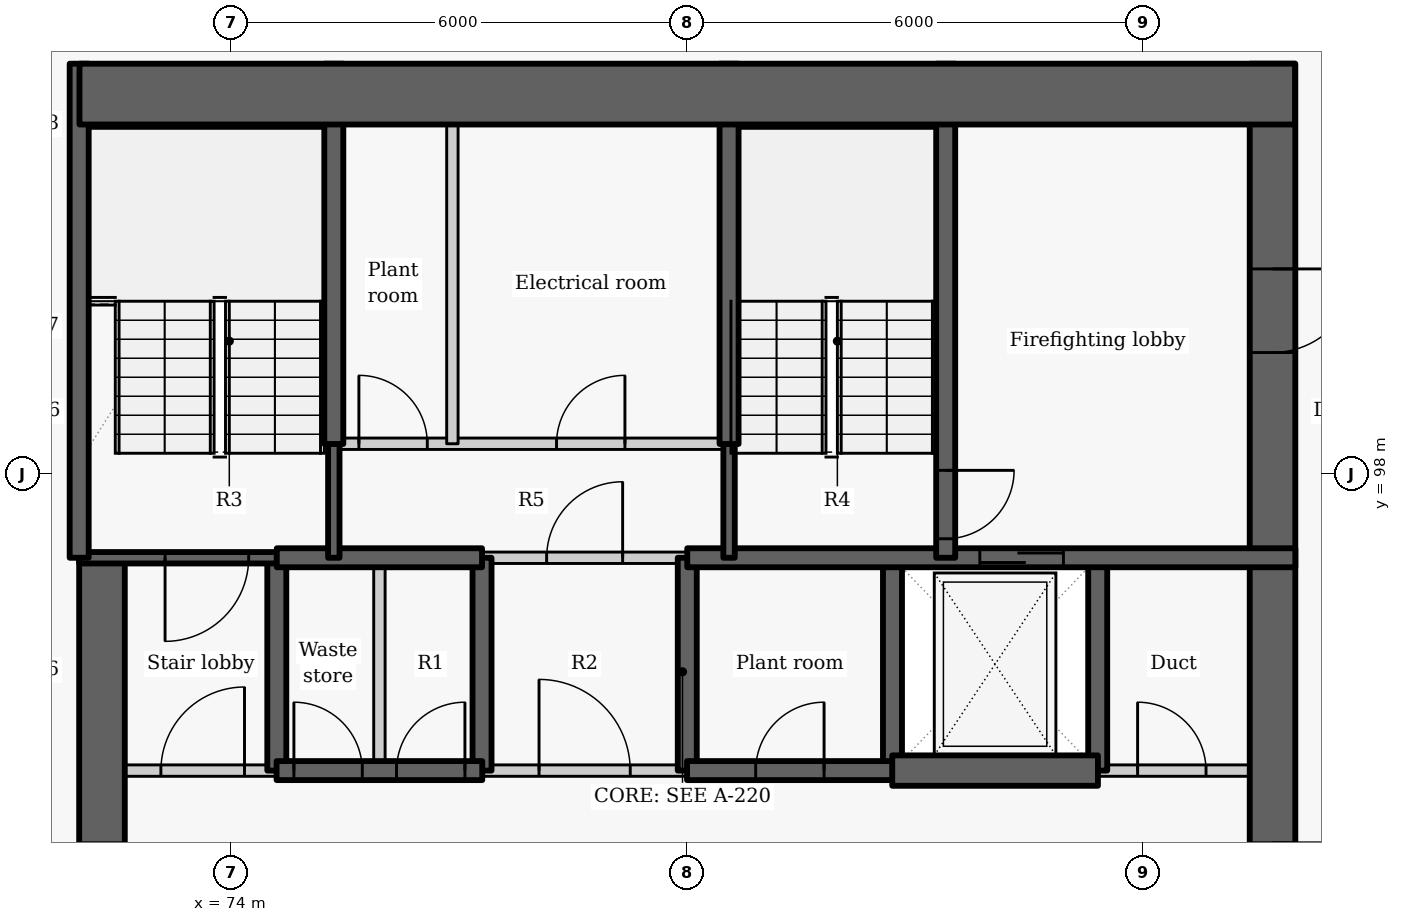
"""IFC4 building model, lengths in metres.
Left out: names, types, materials, properties, quantities, classifications, styles, units other than length and angle.
Written with IfcOpenShell. Run it as: python <this file> out.ifc"""

import sys

from ifc_helpers import new_model, si_unit, direction, frame, frame_2d, origin, place, context, subcontext, project, spatial, rectangle, extrude, element, fill, save


model = new_model("IFC4")
c1 = context("Model", 3, precision=1e-05, world=origin(), true_north=direction((0.0, 1.0)))
c2 = subcontext(c1, "Body", "Model", "MODEL_VIEW")
j1 = project(units=[si_unit("LENGTHUNIT", "METRE"), si_unit("PLANEANGLEUNIT", "RADIAN")], contexts=[c1])
p1 = place(None, origin())
s1 = spatial("IfcSite", under=j1, at=p1, CompositionType="ELEMENT")
p2 = place(p1, origin())
s2 = spatial("IfcBuilding", under=s1, at=p2, CompositionType="ELEMENT")
p3 = place(p2, frame((0.0, 0.0, 107.4)))
s3 = spatial("IfcBuildingStorey", under=s2, at=p3, CompositionType="ELEMENT", Elevation=107.4)
p4 = place(p3, frame((74.6, 94.1, -0.275), z_axis=(0.0, 0.0, 1.0), x_axis=(0.0, 1.0, 0.0)))
e1 = element("IfcWall", 1, at=p4, inside=s3, PredefinedType="SHEAR", context=c2, shape_type="SweptSolid", body=[
    extrude(rectangle(XDim=2.8, YDim=0.25, at=frame_2d((1.4, 0.0))), origin(), (0.0, 0.0, 1.0), 3.3),
])
p5 = place(p3, frame((72.3, 87.8, -0.275), z_axis=(0.0, 0.0, 1.0), x_axis=(0.0, 1.0, 0.0)))
e2 = element("IfcWall", 2, at=p5, inside=s3, PredefinedType="SHEAR", context=c2, shape_type="SweptSolid", body=[
    extrude(rectangle(XDim=9.1, YDim=0.6, at=frame_2d((4.55, 0.0))), origin(), (0.0, 0.0, 1.0), 3.3),
])
p6 = place(p5, frame((3.85, 0.0, 0.275)))
e3 = element("IfcOpeningElement", 3, at=p6, cuts=e2, PredefinedType="OPENING", context=c2, shape_type="SweptSolid", body=[
    extrude(rectangle(XDim=1.5, YDim=2.1, at=frame_2d((0.75, 1.05))), frame((0.0, 0.31, 0.0), z_axis=(0.0, -1.0, 0.0), x_axis=(1.0, 0.0, 0.0)), (0.0, 0.0, 1.0), 0.62),
])
for number, where, z_axis, x_axis in (
    (4, (77.3, 94.1, -0.275), (0.0, 0.0, 1.0), (0.0, 1.0, 0.0)),
    (5, (80.0, 94.1, -0.275), (0.0, 0.0, 1.0), (0.0, 1.0, 0.0)),
    (6, (82.7, 94.1, -0.275), (0.0, 0.0, 1.0), (0.0, 1.0, 0.0)),
    (7, (85.4, 94.1, -0.275), (0.0, 0.0, 1.0), (0.0, 1.0, 0.0)),
):
    element("IfcWall", number, at=place(p3, frame(where, z_axis=z_axis, x_axis=x_axis)), inside=s3, PredefinedType="SHEAR", context=c2, shape_type="SweptSolid", body=[
        extrude(rectangle(XDim=2.8, YDim=0.25, at=frame_2d((1.4, 0.0))), origin(), (0.0, 0.0, 1.0), 3.3),
    ])
p7 = place(p3, frame((87.7, 103.4, -0.275), z_axis=(0.0, 0.0, 1.0), x_axis=(0.0, -1.0, 0.0)))
e8 = element("IfcWall", 8, at=p7, inside=s3, PredefinedType="SHEAR", context=c2, shape_type="SweptSolid", body=[
    extrude(rectangle(XDim=15.6, YDim=0.6, at=frame_2d((7.8, 0.0))), origin(), (0.0, 0.0, 1.0), 3.3),
])
p8 = place(p7, frame((10.25, 0.0, 0.275)))
e9 = element("IfcOpeningElement", 9, at=p8, cuts=e8, PredefinedType="OPENING", context=c2, shape_type="SweptSolid", body=[
    extrude(rectangle(XDim=1.5, YDim=2.1, at=frame_2d((0.75, 1.05))), frame((0.0, 0.31, 0.0), z_axis=(0.0, -1.0, 0.0), x_axis=(1.0, 0.0, 0.0)), (0.0, 0.0, 1.0), 0.62),
])
p9 = place(p7, frame((2.7, 0.0, 0.275)))
e10 = element("IfcOpeningElement", 10, at=p9, cuts=e8, PredefinedType="OPENING", context=c2, shape_type="SweptSolid", body=[
    extrude(rectangle(XDim=1.1, YDim=2.1, at=frame_2d((0.55, 1.05))), frame((0.0, 0.31, 0.0), z_axis=(0.0, -1.0, 0.0), x_axis=(1.0, 0.0, 0.0)), (0.0, 0.0, 1.0), 0.62),
])
p10 = place(p3, frame((72.0, 94.1, 0.0), z_axis=(0.0, 0.0, 1.0), x_axis=(1.0, 0.0, 0.0)))
e11 = element("IfcWall", 11, at=p10, inside=s3, PredefinedType="PARTITIONING", context=c2, shape_type="SweptSolid", body=[
    extrude(rectangle(XDim=2.603, YDim=0.15, at=frame_2d((1.302, 0.0))), origin(), (0.0, 0.0, 1.0), 3.025),
])
p11 = place(p10, frame((1.075, 0.0, 0.0)))
e12 = element("IfcOpeningElement", 12, at=p11, cuts=e11, PredefinedType="OPENING", context=c2, shape_type="SweptSolid", body=[
    extrude(rectangle(XDim=1.1, YDim=2.1, at=frame_2d((0.55, 1.05))), frame((0.0, 0.085, 0.0), z_axis=(0.0, -1.0, 0.0), x_axis=(1.0, 0.0, 0.0)), (0.0, 0.0, 1.0), 0.17),
])
p12 = place(p3, frame((77.297, 94.1, 0.0), z_axis=(0.0, 0.0, 1.0), x_axis=(1.0, 0.0, 0.0)))
e13 = element("IfcWall", 13, at=p12, inside=s3, PredefinedType="PARTITIONING", context=c2, shape_type="SweptSolid", body=[
    extrude(rectangle(XDim=2.706, YDim=0.15, at=frame_2d((1.353, 0.0))), origin(), (0.0, 0.0, 1.0), 3.025),
])
p13 = place(p12, frame((0.753, 0.0, 0.0)))
e14 = element("IfcOpeningElement", 14, at=p13, cuts=e13, PredefinedType="OPENING", context=c2, shape_type="SweptSolid", body=[
    extrude(rectangle(XDim=1.2, YDim=2.1, at=frame_2d((0.6, 1.05))), frame((0.0, 0.085, 0.0), z_axis=(0.0, -1.0, 0.0), x_axis=(1.0, 0.0, 0.0)), (0.0, 0.0, 1.0), 0.17),
])
p14 = place(p3, frame((85.397, 94.1, 0.0), z_axis=(0.0, 0.0, 1.0), x_axis=(1.0, 0.0, 0.0)))
e15 = element("IfcWall", 15, at=p14, inside=s3, PredefinedType="PARTITIONING", context=c2, shape_type="SweptSolid", body=[
    extrude(rectangle(XDim=2.603, YDim=0.15, at=frame_2d((1.302, 0.0))), origin(), (0.0, 0.0, 1.0), 3.025),
])
p15 = place(p14, frame((0.528, 0.0, 0.0)))
e16 = element("IfcOpeningElement", 16, at=p15, cuts=e15, PredefinedType="OPENING", context=c2, shape_type="SweptSolid", body=[
    extrude(rectangle(XDim=0.9, YDim=2.1, at=frame_2d((0.45, 1.05))), frame((0.0, 0.085, 0.0), z_axis=(0.0, -1.0, 0.0), x_axis=(1.0, 0.0, 0.0)), (0.0, 0.0, 1.0), 0.17),
])
p16 = place(p3, frame((74.597, 94.1, -0.275), z_axis=(0.0, 0.0, 1.0), x_axis=(1.0, 0.0, 0.0)))
e17 = element("IfcWall", 17, at=p16, inside=s3, PredefinedType="SHEAR", context=c2, shape_type="SweptSolid", body=[
    extrude(rectangle(XDim=2.706, YDim=0.25, at=frame_2d((1.353, 0.0))), origin(), (0.0, 0.0, 1.0), 3.3),
])
p17 = place(p16, frame((0.228, 0.0, 0.275)))
e18 = element("IfcOpeningElement", 18, at=p17, cuts=e17, PredefinedType="OPENING", context=c2, shape_type="SweptSolid", body=[
    extrude(rectangle(XDim=0.9, YDim=2.1, at=frame_2d((0.45, 1.05))), frame((0.0, 0.135, 0.0), z_axis=(0.0, -1.0, 0.0), x_axis=(1.0, 0.0, 0.0)), (0.0, 0.0, 1.0), 0.27),
])
p18 = place(p16, frame((1.578, 0.0, 0.275)))
e19 = element("IfcOpeningElement", 19, at=p18, cuts=e17, PredefinedType="OPENING", context=c2, shape_type="SweptSolid", body=[
    extrude(rectangle(XDim=0.9, YDim=2.1, at=frame_2d((0.45, 1.05))), frame((0.0, 0.135, 0.0), z_axis=(0.0, -1.0, 0.0), x_axis=(1.0, 0.0, 0.0)), (0.0, 0.0, 1.0), 0.27),
])
p19 = place(p3, frame((79.997, 94.1, -0.275), z_axis=(0.0, 0.0, 1.0), x_axis=(1.0, 0.0, 0.0)))
e20 = element("IfcWall", 20, at=p19, inside=s3, PredefinedType="SHEAR", context=c2, shape_type="SweptSolid", body=[
    extrude(rectangle(XDim=2.706, YDim=0.25, at=frame_2d((1.353, 0.0))), origin(), (0.0, 0.0, 1.0), 3.3),
])
p20 = place(p19, frame((0.903, 0.0, 0.275)))
e21 = element("IfcOpeningElement", 21, at=p20, cuts=e20, PredefinedType="OPENING", context=c2, shape_type="SweptSolid", body=[
    extrude(rectangle(XDim=0.9, YDim=2.1, at=frame_2d((0.45, 1.05))), frame((0.0, 0.135, 0.0), z_axis=(0.0, -1.0, 0.0), x_axis=(1.0, 0.0, 0.0)), (0.0, 0.0, 1.0), 0.27),
])
p21 = place(p3, frame((82.697, 94.1, -0.275), z_axis=(0.0, 0.0, 1.0), x_axis=(1.0, 0.0, 0.0)))
e22 = element("IfcWall", 22, at=p21, inside=s3, PredefinedType="SHEAR", context=c2, shape_type="SweptSolid", body=[
    extrude(rectangle(XDim=2.706, YDim=0.4, at=frame_2d((1.353, 0.0))), origin(), (0.0, 0.0, 1.0), 3.3),
])
p22 = place(p3, frame((74.6, 96.9, -0.275), z_axis=(0.0, 0.0, 1.0), x_axis=(-1.0, 0.0, 0.0)))
e23 = element("IfcWall", 23, at=p22, inside=s3, PredefinedType="SHEAR", context=c2, shape_type="SweptSolid", body=[
    extrude(rectangle(XDim=2.6, YDim=0.15, at=frame_2d((1.3, 0.0))), origin(), (0.0, 0.0, 1.0), 3.3),
])
p23 = place(p22, frame((0.37, 0.0, 0.275)))
e24 = element("IfcOpeningElement", 24, at=p23, cuts=e23, PredefinedType="OPENING", context=c2, shape_type="SweptSolid", body=[
    extrude(rectangle(XDim=1.1, YDim=2.1, at=frame_2d((0.55, 1.05))), frame((0.0, 0.085, 0.0), z_axis=(0.0, -1.0, 0.0), x_axis=(1.0, 0.0, 0.0)), (0.0, 0.0, 1.0), 0.17),
])
p24 = place(p3, frame((75.95, 94.1, 0.0), z_axis=(0.0, 0.0, 1.0), x_axis=(0.0, 1.0, 0.0)))
e25 = element("IfcWall", 25, at=p24, inside=s3, PredefinedType="PARTITIONING", context=c2, shape_type="SweptSolid", body=[
    extrude(rectangle(XDim=2.8, YDim=0.15, at=frame_2d((1.4, 0.0))), origin(), (0.0, 0.0, 1.0), 3.025),
])
p25 = place(p3, frame((74.6, 96.9, -0.275), z_axis=(0.0, 0.0, 1.0), x_axis=(1.0, 0.0, 0.0)))
e26 = element("IfcWall", 26, at=p25, inside=s3, PredefinedType="SHEAR", context=c2, shape_type="SweptSolid", body=[
    extrude(rectangle(XDim=2.7, YDim=0.25, at=frame_2d((1.35, 0.0))), origin(), (0.0, 0.0, 1.0), 3.3),
])
p26 = place(p3, frame((80.0, 96.9, -0.275), z_axis=(0.0, 0.0, 1.0), x_axis=(1.0, 0.0, 0.0)))
e27 = element("IfcWall", 27, at=p26, inside=s3, PredefinedType="SHEAR", context=c2, shape_type="SweptSolid", body=[
    extrude(rectangle(XDim=8.0, YDim=0.25, at=frame_2d((4.0, 0.0))), origin(), (0.0, 0.0, 1.0), 3.3),
])
p27 = place(p26, frame((3.849, 0.0, 0.275)))
e28 = element("IfcOpeningElement", 28, at=p27, cuts=e27, PredefinedType="OPENING", context=c2, shape_type="SweptSolid", body=[
    extrude(rectangle(XDim=1.1, YDim=2.1, at=frame_2d((0.55, 1.05))), frame((0.0, 0.135, 0.0), z_axis=(0.0, -1.0, 0.0), x_axis=(1.0, 0.0, 0.0)), (0.0, 0.0, 1.0), 0.27),
])
p28 = place(p3, frame((77.3, 96.9, 0.0), z_axis=(0.0, 0.0, 1.0), x_axis=(1.0, 0.0, 0.0)))
e29 = element("IfcWall", 29, at=p28, inside=s3, PredefinedType="PARTITIONING", context=c2, shape_type="SweptSolid", body=[
    extrude(rectangle(XDim=2.7, YDim=0.15, at=frame_2d((1.35, 0.0))), origin(), (0.0, 0.0, 1.0), 3.025),
])
p29 = place(p28, frame((0.85, 0.0, 0.0)))
e30 = element("IfcOpeningElement", 30, at=p29, cuts=e29, PredefinedType="OPENING", context=c2, shape_type="SweptSolid", body=[
    extrude(rectangle(XDim=1.0, YDim=2.1, at=frame_2d((0.5, 1.05))), frame((0.0, 0.085, 0.0), z_axis=(0.0, -1.0, 0.0), x_axis=(1.0, 0.0, 0.0)), (0.0, 0.0, 1.0), 0.17),
])
p30 = place(p3, frame((75.35, 96.9, -0.275), z_axis=(0.0, 0.0, 1.0), x_axis=(0.0, 1.0, 0.0)))
e31 = element("IfcWall", 31, at=p30, inside=s3, PredefinedType="SHEAR", context=c2, shape_type="SweptSolid", body=[
    extrude(rectangle(XDim=1.503, YDim=0.15, at=frame_2d((0.751, 0.0))), origin(), (0.0, 0.0, 1.0), 3.3),
])
p31 = place(p3, frame((75.35, 98.397, -0.275), z_axis=(0.0, 0.0, 1.0), x_axis=(0.0, 1.0, 0.0)))
e32 = element("IfcWall", 32, at=p31, inside=s3, PredefinedType="SHEAR", context=c2, shape_type="SweptSolid", body=[
    extrude(rectangle(XDim=5.003, YDim=0.25, at=frame_2d((2.501, 0.0))), origin(), (0.0, 0.0, 1.0), 3.3),
])
p32 = place(p3, frame((72.0, 96.9, -0.275), z_axis=(0.0, 0.0, 1.0), x_axis=(0.0, 1.0, 0.0)))
e33 = element("IfcWall", 33, at=p32, inside=s3, PredefinedType="SHEAR", context=c2, shape_type="SweptSolid", body=[
    extrude(rectangle(XDim=6.5, YDim=0.25, at=frame_2d((3.25, 0.0))), origin(), (0.0, 0.0, 1.0), 3.3),
])
p33 = place(p3, frame((83.4, 103.4, -0.275), z_axis=(0.0, 0.0, 1.0), x_axis=(0.0, -1.0, 0.0)))
e34 = element("IfcWall", 34, at=p33, inside=s3, PredefinedType="SHEAR", context=c2, shape_type="SweptSolid", body=[
    extrude(rectangle(XDim=6.5, YDim=0.25, at=frame_2d((3.25, 0.0))), origin(), (0.0, 0.0, 1.0), 3.3),
])
p34 = place(p33, frame((5.35, 0.0, 0.275)))
e35 = element("IfcOpeningElement", 35, at=p34, cuts=e34, PredefinedType="OPENING", context=c2, shape_type="SweptSolid", body=[
    extrude(rectangle(XDim=0.9, YDim=2.1, at=frame_2d((0.45, 1.05))), frame((0.0, 0.135, 0.0), z_axis=(0.0, -1.0, 0.0), x_axis=(1.0, 0.0, 0.0)), (0.0, 0.0, 1.0), 0.27),
])
p35 = place(p3, frame((80.55, 96.9, -0.275), z_axis=(0.0, 0.0, 1.0), x_axis=(0.0, 1.0, 0.0)))
e36 = element("IfcWall", 36, at=p35, inside=s3, PredefinedType="SHEAR", context=c2, shape_type="SweptSolid", body=[
    extrude(rectangle(XDim=1.503, YDim=0.15, at=frame_2d((0.751, 0.0))), origin(), (0.0, 0.0, 1.0), 3.3),
])
p36 = place(p3, frame((80.55, 98.397, -0.275), z_axis=(0.0, 0.0, 1.0), x_axis=(0.0, 1.0, 0.0)))
e37 = element("IfcWall", 37, at=p36, inside=s3, PredefinedType="SHEAR", context=c2, shape_type="SweptSolid", body=[
    extrude(rectangle(XDim=5.003, YDim=0.25, at=frame_2d((2.501, 0.0))), origin(), (0.0, 0.0, 1.0), 3.3),
])
p37 = place(p3, frame((75.35, 98.4, 0.0), z_axis=(0.0, 0.0, 1.0), x_axis=(1.0, 0.0, 0.0)))
e38 = element("IfcWall", 38, at=p37, inside=s3, PredefinedType="PARTITIONING", context=c2, shape_type="SweptSolid", body=[
    extrude(rectangle(XDim=5.2, YDim=0.15, at=frame_2d((2.6, 0.0))), origin(), (0.0, 0.0, 1.0), 3.025),
])
p38 = place(p37, frame((0.33, 0.0, 0.0)))
e39 = element("IfcOpeningElement", 39, at=p38, cuts=e38, PredefinedType="OPENING", context=c2, shape_type="SweptSolid", body=[
    extrude(rectangle(XDim=0.9, YDim=2.1, at=frame_2d((0.45, 1.05))), frame((0.0, 0.085, 0.0), z_axis=(0.0, -1.0, 0.0), x_axis=(1.0, 0.0, 0.0)), (0.0, 0.0, 1.0), 0.17),
])
p39 = place(p37, frame((2.93, 0.0, 0.0)))
e40 = element("IfcOpeningElement", 40, at=p39, cuts=e38, PredefinedType="OPENING", context=c2, shape_type="SweptSolid", body=[
    extrude(rectangle(XDim=0.9, YDim=2.1, at=frame_2d((0.45, 1.05))), frame((0.0, 0.085, 0.0), z_axis=(0.0, -1.0, 0.0), x_axis=(1.0, 0.0, 0.0)), (0.0, 0.0, 1.0), 0.17),
])
p40 = place(p3, frame((76.91, 98.4, 0.0), z_axis=(0.0, 0.0, 1.0), x_axis=(0.0, 1.0, 0.0)))
e41 = element("IfcWall", 41, at=p40, inside=s3, PredefinedType="PARTITIONING", context=c2, shape_type="SweptSolid", body=[
    extrude(rectangle(XDim=5.0, YDim=0.15, at=frame_2d((2.5, 0.0))), origin(), (0.0, 0.0, 1.0), 3.025),
])
p41 = place(p3, frame((72.004, 103.0, -0.275), z_axis=(0.0, 0.0, 1.0), x_axis=(1.0, 0.0, 0.0)))
e42 = element("IfcWall", 42, at=p41, inside=s3, PredefinedType="SHEAR", context=c2, shape_type="SweptSolid", body=[
    extrude(rectangle(XDim=15.992, YDim=0.8, at=frame_2d((7.996, 0.0))), origin(), (0.0, 0.0, 1.0), 3.3),
])
p42 = place(p11, origin())
e43 = element("IfcDoor", 43, at=p42, inside=s3, OperationType="SINGLE_SWING_RIGHT", PredefinedType="DOOR", context=c2, shape_type="SweptSolid", body=[
    extrude(rectangle(XDim=1.1, YDim=2.1, at=frame_2d((0.55, 1.05))), frame((0.0, 0.025, 0.0), z_axis=(0.0, -1.0, 0.0), x_axis=(1.0, 0.0, 0.0)), (0.0, 0.0, 1.0), 0.05),
])
fill(e12, e43)
p43 = place(p17, origin())
e44 = element("IfcDoor", 44, at=p43, inside=s3, OperationType="SINGLE_SWING_LEFT", PredefinedType="DOOR", context=c2, shape_type="SweptSolid", body=[
    extrude(rectangle(XDim=0.9, YDim=2.1, at=frame_2d((0.45, 1.05))), frame((0.0, 0.025, 0.0), z_axis=(0.0, -1.0, 0.0), x_axis=(1.0, 0.0, 0.0)), (0.0, 0.0, 1.0), 0.05),
])
fill(e18, e44)
p44 = place(p18, origin())
e45 = element("IfcDoor", 45, at=p44, inside=s3, OperationType="SINGLE_SWING_RIGHT", PredefinedType="DOOR", context=c2, shape_type="SweptSolid", body=[
    extrude(rectangle(XDim=0.9, YDim=2.1, at=frame_2d((0.45, 1.05))), frame((0.0, 0.025, 0.0), z_axis=(0.0, -1.0, 0.0), x_axis=(1.0, 0.0, 0.0)), (0.0, 0.0, 1.0), 0.05),
])
fill(e19, e45)
p45 = place(p13, origin())
e46 = element("IfcDoor", 46, at=p45, inside=s3, OperationType="DOUBLE_DOOR_SINGLE_SWING", PredefinedType="DOOR", context=c2, shape_type="SweptSolid", body=[
    extrude(rectangle(XDim=1.2, YDim=2.1, at=frame_2d((0.6, 1.05))), frame((0.0, 0.025, 0.0), z_axis=(0.0, -1.0, 0.0), x_axis=(1.0, 0.0, 0.0)), (0.0, 0.0, 1.0), 0.05),
])
fill(e14, e46)
p46 = place(p20, origin())
e47 = element("IfcDoor", 47, at=p46, inside=s3, OperationType="SINGLE_SWING_RIGHT", PredefinedType="DOOR", context=c2, shape_type="SweptSolid", body=[
    extrude(rectangle(XDim=0.9, YDim=2.1, at=frame_2d((0.45, 1.05))), frame((0.0, 0.025, 0.0), z_axis=(0.0, -1.0, 0.0), x_axis=(1.0, 0.0, 0.0)), (0.0, 0.0, 1.0), 0.05),
])
fill(e21, e47)
p47 = place(p27, origin())
e48 = element("IfcDoor", 48, at=p47, inside=s3, OperationType="SLIDING_TO_LEFT", PredefinedType="DOOR", context=c2, shape_type="SweptSolid", body=[
    extrude(rectangle(XDim=1.1, YDim=2.1, at=frame_2d((0.55, 1.05))), frame((0.0, 0.025, 0.0), z_axis=(0.0, -1.0, 0.0), x_axis=(1.0, 0.0, 0.0)), (0.0, 0.0, 1.0), 0.05),
])
fill(e28, e48)
p48 = place(p15, origin())
e49 = element("IfcDoor", 49, at=p48, inside=s3, OperationType="SINGLE_SWING_LEFT", PredefinedType="DOOR", context=c2, shape_type="SweptSolid", body=[
    extrude(rectangle(XDim=0.9, YDim=2.1, at=frame_2d((0.45, 1.05))), frame((0.0, 0.025, 0.0), z_axis=(0.0, -1.0, 0.0), x_axis=(1.0, 0.0, 0.0)), (0.0, 0.0, 1.0), 0.05),
])
fill(e16, e49)
p49 = place(p29, origin())
e50 = element("IfcDoor", 50, at=p49, inside=s3, OperationType="SINGLE_SWING_RIGHT", PredefinedType="DOOR", context=c2, shape_type="SweptSolid", body=[
    extrude(rectangle(XDim=1.0, YDim=2.1, at=frame_2d((0.5, 1.05))), frame((0.0, 0.025, 0.0), z_axis=(0.0, -1.0, 0.0), x_axis=(1.0, 0.0, 0.0)), (0.0, 0.0, 1.0), 0.05),
])
fill(e30, e50)
p50 = place(p38, origin())
e51 = element("IfcDoor", 51, at=p50, inside=s3, OperationType="SINGLE_SWING_LEFT", PredefinedType="DOOR", context=c2, shape_type="SweptSolid", body=[
    extrude(rectangle(XDim=0.9, YDim=2.1, at=frame_2d((0.45, 1.05))), frame((0.0, 0.025, 0.0), z_axis=(0.0, -1.0, 0.0), x_axis=(1.0, 0.0, 0.0)), (0.0, 0.0, 1.0), 0.05),
])
fill(e39, e51)
p51 = place(p39, origin())
e52 = element("IfcDoor", 52, at=p51, inside=s3, OperationType="SINGLE_SWING_RIGHT", PredefinedType="DOOR", context=c2, shape_type="SweptSolid", body=[
    extrude(rectangle(XDim=0.9, YDim=2.1, at=frame_2d((0.45, 1.05))), frame((0.0, 0.025, 0.0), z_axis=(0.0, -1.0, 0.0), x_axis=(1.0, 0.0, 0.0)), (0.0, 0.0, 1.0), 0.05),
])
fill(e40, e52)
p52 = place(p23, origin())
e53 = element("IfcDoor", 53, at=p52, inside=s3, OperationType="SINGLE_SWING_RIGHT", PredefinedType="DOOR", context=c2, shape_type="SweptSolid", body=[
    extrude(rectangle(XDim=1.1, YDim=2.1, at=frame_2d((0.55, 1.05))), frame((0.0, 0.025, 0.0), z_axis=(0.0, -1.0, 0.0), x_axis=(1.0, 0.0, 0.0)), (0.0, 0.0, 1.0), 0.05),
])
fill(e24, e53)
p53 = place(p34, origin())
e54 = element("IfcDoor", 54, at=p53, inside=s3, OperationType="SINGLE_SWING_LEFT", PredefinedType="DOOR", context=c2, shape_type="SweptSolid", body=[
    extrude(rectangle(XDim=0.9, YDim=2.1, at=frame_2d((0.45, 1.05))), frame((0.0, 0.025, 0.0), z_axis=(0.0, -1.0, 0.0), x_axis=(1.0, 0.0, 0.0)), (0.0, 0.0, 1.0), 0.05),
])
fill(e35, e54)
p54 = place(p6, origin())
e55 = element("IfcDoor", 55, at=p54, inside=s3, OperationType="DOUBLE_DOOR_SINGLE_SWING", PredefinedType="DOOR", context=c2, shape_type="SweptSolid", body=[
    extrude(rectangle(XDim=1.5, YDim=2.1, at=frame_2d((0.75, 1.05))), frame((0.0, 0.025, 0.0), z_axis=(0.0, -1.0, 0.0), x_axis=(1.0, 0.0, 0.0)), (0.0, 0.0, 1.0), 0.05),
])
fill(e3, e55)
p55 = place(p9, origin())
e56 = element("IfcDoor", 56, at=p55, inside=s3, OperationType="SINGLE_SWING_LEFT", PredefinedType="DOOR", context=c2, shape_type="SweptSolid", body=[
    extrude(rectangle(XDim=1.1, YDim=2.1, at=frame_2d((0.55, 1.05))), frame((0.0, 0.025, 0.0), z_axis=(0.0, -1.0, 0.0), x_axis=(1.0, 0.0, 0.0)), (0.0, 0.0, 1.0), 0.05),
])
fill(e10, e56)
save(model, sys.argv[1])
